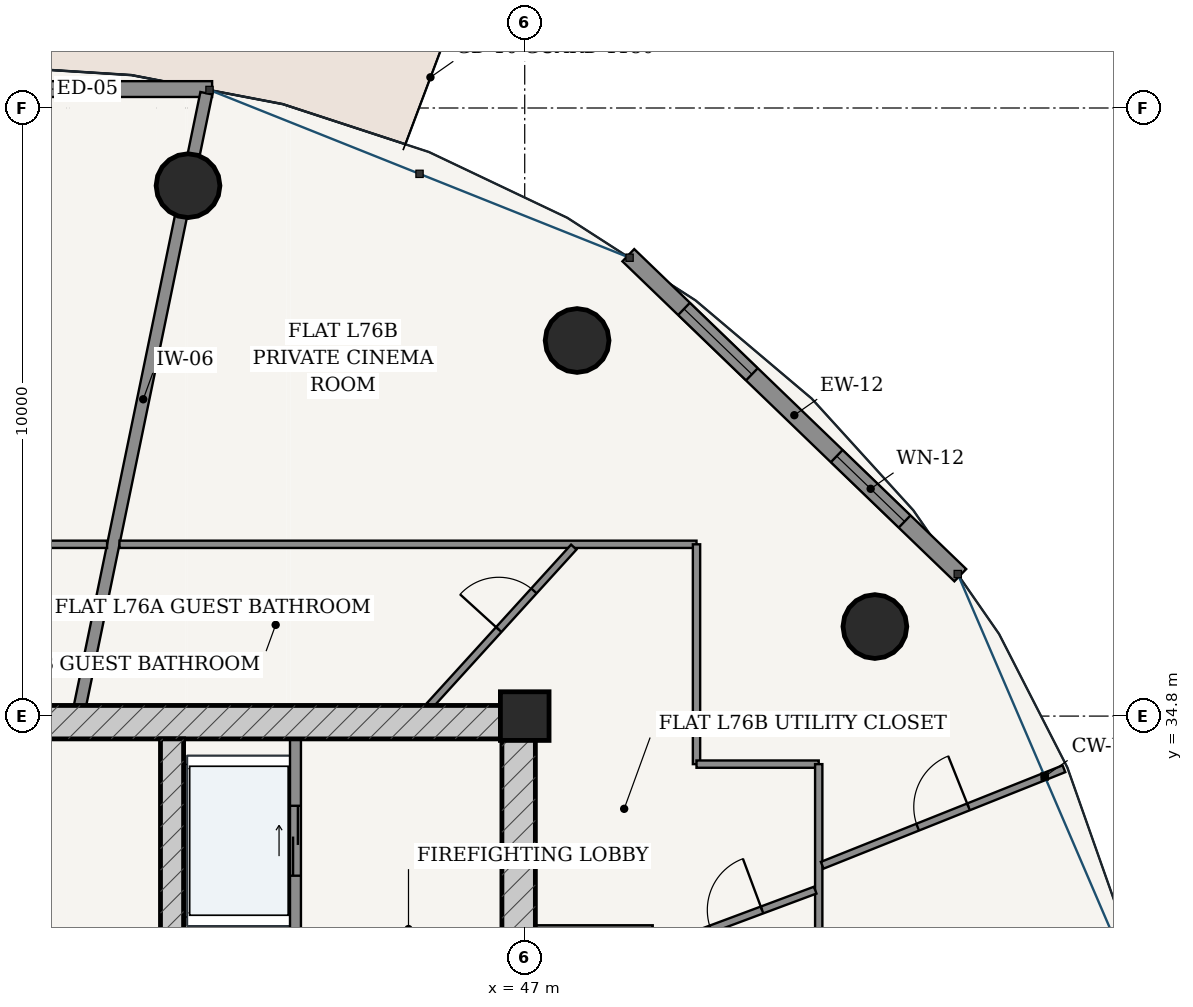
"""IFC4 building model, lengths in metres.
Left out: names, types, materials, properties, quantities, classifications, styles, units other than length and angle.
Written with IfcOpenShell. Run it as: python <this file> out.ifc"""

import sys

from ifc_helpers import new_model, si_unit, direction, frame, frame_2d, origin, origin_2d, place, context, subcontext, project, spatial, rectangle, hollow_circle, extrude, source, transform, mapped, element, fill, save


model = new_model("IFC4")
c1 = context("Model", 3, precision=1e-05, world=origin(), true_north=direction((-0.2419218956, 0.970295726276)))
c2 = subcontext(c1, "Body", "Model", "MODEL_VIEW")
j1 = project(units=[si_unit("LENGTHUNIT", "METRE"), si_unit("PLANEANGLEUNIT", "RADIAN")], contexts=[c1])
p1 = place(None, origin())
s1 = spatial("IfcSite", under=j1, at=p1, CompositionType="ELEMENT")
p2 = place(p1, origin())
s2 = spatial("IfcBuilding", under=s1, at=p2, CompositionType="ELEMENT")
p3 = place(p2, frame((0.0, 0.0, 289.45)))
s3 = spatial("IfcBuildingStorey", under=s2, at=p3, CompositionType="ELEMENT", Elevation=289.45)
p4 = place(p3, frame((47.0, 34.8, 0.0), z_axis=(0.0, 0.0, 1.0), x_axis=(1.0, 0.0, 0.0)))
e1 = element("IfcColumn", 1, at=p4, inside=s3, PredefinedType="COLUMN", context=c2, shape_type="SweptSolid", body=[
    extrude(rectangle(XDim=0.8, YDim=0.8, at=origin_2d()), origin(), (0.0, 0.0, 1.0), 3.75),
])
p5 = place(p3, frame((28.825, 34.7, 0.0), z_axis=(0.0, 0.0, 1.0), x_axis=(1.0, 0.0, 0.0)))
e2 = element("IfcWall", 2, at=p5, inside=s3, PredefinedType="SHEAR", context=c2, shape_type="SweptSolid", body=[
    extrude(rectangle(XDim=18.35, YDim=0.55, at=frame_2d((9.175, 0.0))), origin(), (0.0, 0.0, 1.0), 3.49),
])
p6 = place(p3, frame((46.9, 19.175, 0.0), z_axis=(0.0, 0.0, 1.0), x_axis=(0.0, 1.0, 0.0)))
e3 = element("IfcWall", 3, at=p6, inside=s3, PredefinedType="SHEAR", context=c2, shape_type="SweptSolid", body=[
    extrude(rectangle(XDim=15.25, YDim=0.55, at=frame_2d((7.625, 0.0))), origin(), (0.0, 0.0, 1.0), 3.49),
])
p7 = place(p6, frame((9.875, 0.0, 0.0)))
e4 = element("IfcOpeningElement", 4, at=p7, cuts=e3, PredefinedType="OPENING", context=c2, shape_type="SweptSolid", body=[
    extrude(rectangle(XDim=1.5, YDim=2.2, at=frame_2d((0.75, 1.1))), frame((0.0, 0.285, 0.0), z_axis=(0.0, -1.0, 0.0), x_axis=(1.0, 0.0, 0.0)), (0.0, 0.0, 1.0), 0.57),
])
p8 = place(p3, frame((41.2, 19.175, 0.0), z_axis=(0.0, 0.0, 1.0), x_axis=(0.0, 1.0, 0.0)))
e5 = element("IfcWall", 5, at=p8, inside=s3, PredefinedType="SHEAR", context=c2, shape_type="SweptSolid", body=[
    extrude(rectangle(XDim=15.25, YDim=0.38, at=frame_2d((7.625, 0.0))), origin(), (0.0, 0.0, 1.0), 3.49),
])
p9 = place(p8, frame((7.8, 0.0, 0.0)))
e6 = element("IfcOpeningElement", 6, at=p9, cuts=e5, PredefinedType="OPENING", context=c2, shape_type="SweptSolid", body=[
    extrude(rectangle(XDim=1.05, YDim=2.15, at=frame_2d((0.525, 1.075))), frame((0.0, 0.2, 0.0), z_axis=(0.0, -1.0, 0.0), x_axis=(1.0, 0.0, 0.0)), (0.0, 0.0, 1.0), 0.4),
])
for number, where, z_axis, x_axis in (
    (7, (52.759, 36.272, 0.0), (0.0, 0.0, 1.0), (1.0, 0.0, 0.0)),
    (8, (47.861, 40.977, 0.0), (0.0, 0.0, 1.0), (1.0, 0.0, 0.0)),
    (9, (41.463, 43.522, 0.0), (0.0, 0.0, 1.0), (1.0, 0.0, 0.0)),
):
    element("IfcColumn", number, at=place(p3, frame(where, z_axis=z_axis, x_axis=x_axis)), inside=s3, PredefinedType="COLUMN", context=c2, shape_type="SweptSolid", body=[
        extrude(hollow_circle(Radius=0.525, WallThickness=0.035, at=origin_2d()), origin(), (0.0, 0.0, 1.0), 3.75),
    ])
p10 = place(p3, frame((54.163, 37.117, 0.0), z_axis=(0.0, 0.0, 1.0), x_axis=(-0.719979309073, 0.693995529169, 0.0)))
e10 = element("IfcWall", 10, at=p10, inside=s3, PredefinedType="SOLIDWALL", context=c2, shape_type="SweptSolid", body=[
    extrude(rectangle(XDim=7.583, YDim=0.28, at=frame_2d((3.791, 0.0))), origin(), (0.0, 0.0, 1.0), 3.49),
])
p11 = place(p10, frame((1.272, 0.0, 0.85)))
e11 = element("IfcOpeningElement", 11, at=p11, cuts=e10, PredefinedType="OPENING", context=c2, shape_type="SweptSolid", body=[
    extrude(rectangle(XDim=1.55, YDim=1.95, at=frame_2d((0.775, 0.975))), frame((0.0, 0.15, 0.0), z_axis=(0.0, -1.0, 0.0), x_axis=(1.0, 0.0, 0.0)), (0.0, 0.0, 1.0), 0.3),
])
p12 = place(p10, frame((4.76, 0.0, 0.85)))
e12 = element("IfcOpeningElement", 12, at=p12, cuts=e10, PredefinedType="OPENING", context=c2, shape_type="SweptSolid", body=[
    extrude(rectangle(XDim=1.55, YDim=1.95, at=frame_2d((0.775, 0.975))), frame((0.0, 0.15, 0.0), z_axis=(0.0, -1.0, 0.0), x_axis=(1.0, 0.0, 0.0)), (0.0, 0.0, 1.0), 0.3),
])
p13 = place(p3, frame((41.859, 45.111, 0.0), z_axis=(0.0, 0.0, 1.0), x_axis=(-1.0, 0.0, 0.0)))
e13 = element("IfcWall", 13, at=p13, inside=s3, PredefinedType="SOLIDWALL", context=c2, shape_type="SweptSolid", body=[
    extrude(rectangle(XDim=7.718, YDim=0.26, at=frame_2d((3.859, 0.0))), origin(), (0.0, 0.0, 1.0), 3.49),
])
p14 = place(p13, frame((3.184, 0.0, 0.0)))
e14 = element("IfcOpeningElement", 14, at=p14, cuts=e13, PredefinedType="OPENING", context=c2, shape_type="SweptSolid", body=[
    extrude(rectangle(XDim=1.35, YDim=2.2, at=frame_2d((0.675, 1.1))), frame((0.0, 0.14, 0.0), z_axis=(0.0, -1.0, 0.0), x_axis=(1.0, 0.0, 0.0)), (0.0, 0.0, 1.0), 0.28),
])
p15 = place(p3, frame((43.23, 28.52, 0.0), z_axis=(0.0, 0.0, 1.0), x_axis=(0.0, 1.0, 0.0)))
e15 = element("IfcWall", 15, at=p15, inside=s3, PredefinedType="PARTITIONING", context=c2, shape_type="SweptSolid", body=[
    extrude(rectangle(XDim=5.905, YDim=0.18, at=frame_2d((2.953, 0.0))), origin(), (0.0, 0.0, 1.0), 3.49),
])
p16 = place(p15, frame((0.905, 0.0, 0.0)))
e16 = element("IfcOpeningElement", 16, at=p16, cuts=e15, PredefinedType="OPENING", context=c2, shape_type="SweptSolid", body=[
    extrude(rectangle(XDim=0.85, YDim=2.1, at=frame_2d((0.425, 1.05))), frame((0.0, 0.1, 0.0), z_axis=(0.0, -1.0, 0.0), x_axis=(1.0, 0.0, 0.0)), (0.0, 0.0, 1.0), 0.2),
])
p17 = place(p15, frame((3.655, 0.0, 0.0)))
e17 = element("IfcOpeningElement", 17, at=p17, cuts=e15, PredefinedType="OPENING", context=c2, shape_type="SweptSolid", body=[
    extrude(rectangle(XDim=1.15, YDim=2.2, at=frame_2d((0.575, 1.1))), frame((0.0, 0.1, 0.0), z_axis=(0.0, -1.0, 0.0), x_axis=(1.0, 0.0, 0.0)), (0.0, 0.0, 1.0), 0.2),
])
p18 = place(p3, frame((47.175, 31.28, 0.0), z_axis=(0.0, 0.0, 1.0), x_axis=(1.0, 0.0, 0.0)))
e18 = element("IfcWall", 18, at=p18, inside=s3, PredefinedType="PARTITIONING", context=c2, shape_type="SweptSolid", body=[
    extrude(rectangle(XDim=1.93, YDim=0.16, at=frame_2d((0.965, 0.0))), origin(), (0.0, 0.0, 1.0), 3.49),
])
p19 = place(p3, frame((39.688, 34.977, 0.0), z_axis=(0.0, 0.0, 1.0), x_axis=(0.202091890364, 0.979366564596, 0.0)))
e19 = element("IfcWall", 19, at=p19, inside=s3, PredefinedType="PARTITIONING", context=c2, shape_type="SweptSolid", body=[
    extrude(rectangle(XDim=10.278, YDim=0.2, at=frame_2d((5.139, 0.0))), origin(), (0.0, 0.0, 1.0), 2.575),
])
p20 = place(p3, frame((26.175, 37.625, 0.0), z_axis=(0.0, 0.0, 1.0), x_axis=(1.0, 0.0, 0.0)))
e20 = element("IfcWall", 20, at=p20, inside=s3, PredefinedType="PARTITIONING", context=c2, shape_type="SweptSolid", body=[
    extrude(rectangle(XDim=13.957, YDim=0.12, at=frame_2d((6.979, 0.0))), origin(), (0.0, 0.0, 1.0), 3.015),
])
p21 = place(p20, frame((10.852, 0.0, 0.0)))
e21 = element("IfcOpeningElement", 21, at=p21, cuts=e20, PredefinedType="OPENING", context=c2, shape_type="SweptSolid", body=[
    extrude(rectangle(XDim=0.86, YDim=2.15, at=frame_2d((0.43, 1.075))), frame((0.0, 0.07, 0.0), z_axis=(0.0, -1.0, 0.0), x_axis=(1.0, 0.0, 0.0)), (0.0, 0.0, 1.0), 0.14),
])
p22 = place(p20, frame((4.183, 0.0, 0.0)))
e22 = element("IfcOpeningElement", 22, at=p22, cuts=e20, PredefinedType="OPENING", context=c2, shape_type="SweptSolid", body=[
    extrude(rectangle(XDim=0.9, YDim=2.15, at=frame_2d((0.45, 1.075))), frame((0.0, 0.07, 0.0), z_axis=(0.0, -1.0, 0.0), x_axis=(1.0, 0.0, 0.0)), (0.0, 0.0, 1.0), 0.14),
])
p23 = place(p3, frame((40.336, 37.625, 0.0), z_axis=(0.0, 0.0, 1.0), x_axis=(1.0, 0.0, 0.0)))
e23 = element("IfcWall", 23, at=p23, inside=s3, PredefinedType="PARTITIONING", context=c2, shape_type="SweptSolid", body=[
    extrude(rectangle(XDim=9.489, YDim=0.12, at=frame_2d((4.745, 0.0))), origin(), (0.0, 0.0, 1.0), 3.015),
])
p24 = place(p3, frame((49.825, 37.625, 0.0), z_axis=(0.0, 0.0, 1.0), x_axis=(0.0, -1.0, 0.0)))
e24 = element("IfcWall", 24, at=p24, inside=s3, PredefinedType="PARTITIONING", context=c2, shape_type="SweptSolid", body=[
    extrude(rectangle(XDim=3.615, YDim=0.12, at=frame_2d((1.808, 0.0))), origin(), (0.0, 0.0, 1.0), 3.015),
])
p25 = place(p3, frame((49.825, 34.01, 0.0), z_axis=(0.0, 0.0, 1.0), x_axis=(1.0, 0.0, 0.0)))
e25 = element("IfcWall", 25, at=p25, inside=s3, PredefinedType="PARTITIONING", context=c2, shape_type="SweptSolid", body=[
    extrude(rectangle(XDim=2.01, YDim=0.12, at=frame_2d((1.005, 0.0))), origin(), (0.0, 0.0, 1.0), 3.209),
])
p26 = place(p3, frame((51.835, 34.01, 0.0), z_axis=(0.0, 0.0, 1.0), x_axis=(0.0, -1.0, 0.0)))
e26 = element("IfcWall", 26, at=p26, inside=s3, PredefinedType="PARTITIONING", context=c2, shape_type="SweptSolid", body=[
    extrude(rectangle(XDim=19.545, YDim=0.12, at=frame_2d((9.772, 0.0))), origin(), (0.0, 0.0, 1.0), 3.015),
])
p27 = place(p26, frame((14.768, 0.0, 0.0)))
e27 = element("IfcOpeningElement", 27, at=p27, cuts=e26, PredefinedType="OPENING", context=c2, shape_type="SweptSolid", body=[
    extrude(rectangle(XDim=0.9, YDim=2.15, at=frame_2d((0.45, 1.075))), frame((0.0, 0.07, 0.0), z_axis=(0.0, -1.0, 0.0), x_axis=(1.0, 0.0, 0.0)), (0.0, 0.0, 1.0), 0.14),
])
p28 = place(p26, frame((8.718, 0.0, 0.0)))
e28 = element("IfcOpeningElement", 28, at=p28, cuts=e26, PredefinedType="OPENING", context=c2, shape_type="SweptSolid", body=[
    extrude(rectangle(XDim=0.9, YDim=2.15, at=frame_2d((0.45, 1.075))), frame((0.0, 0.07, 0.0), z_axis=(0.0, -1.0, 0.0), x_axis=(1.0, 0.0, 0.0)), (0.0, 0.0, 1.0), 0.14),
])
p29 = place(p26, frame((4.14, 0.0, 0.0)))
e29 = element("IfcOpeningElement", 29, at=p29, cuts=e26, PredefinedType="OPENING", context=c2, shape_type="SweptSolid", body=[
    extrude(rectangle(XDim=0.9, YDim=2.15, at=frame_2d((0.45, 1.075))), frame((0.0, 0.07, 0.0), z_axis=(0.0, -1.0, 0.0), x_axis=(1.0, 0.0, 0.0)), (0.0, 0.0, 1.0), 0.14),
])
p30 = place(p3, frame((51.893, 32.347, 0.0), z_axis=(0.0, 0.0, 1.0), x_axis=(0.928712556691, 0.370800467966, 0.0)))
e30 = element("IfcWall", 30, at=p30, inside=s3, PredefinedType="PARTITIONING", context=c2, shape_type="SweptSolid", body=[
    extrude(rectangle(XDim=4.28, YDim=0.12, at=frame_2d((2.14, 0.0))), origin(), (0.0, 0.0, 1.0), 3.121),
])
p31 = place(p30, frame((1.69, 0.0, 0.0)))
e31 = element("IfcOpeningElement", 31, at=p31, cuts=e30, PredefinedType="OPENING", context=c2, shape_type="SweptSolid", body=[
    extrude(rectangle(XDim=0.9, YDim=2.15, at=frame_2d((0.45, 1.075))), frame((0.0, 0.07, 0.0), z_axis=(0.0, -1.0, 0.0), x_axis=(1.0, 0.0, 0.0)), (0.0, 0.0, 1.0), 0.14),
])
p32 = place(p3, frame((49.185, 30.971, 0.0), z_axis=(0.0, 0.0, 1.0), x_axis=(0.93696600231, 0.349420535338, 0.0)))
e32 = element("IfcWall", 32, at=p32, inside=s3, PredefinedType="PARTITIONING", context=c2, shape_type="SweptSolid", body=[
    extrude(rectangle(XDim=2.766, YDim=0.12, at=frame_2d((1.383, 0.0))), origin(), (0.0, 0.0, 1.0), 3.209),
])
p33 = place(p32, frame((0.933, 0.0, 0.0)))
e33 = element("IfcOpeningElement", 33, at=p33, cuts=e32, PredefinedType="OPENING", context=c2, shape_type="SweptSolid", body=[
    extrude(rectangle(XDim=0.9, YDim=2.15, at=frame_2d((0.45, 1.075))), frame((0.0, 0.07, 0.0), z_axis=(0.0, -1.0, 0.0), x_axis=(1.0, 0.0, 0.0)), (0.0, 0.0, 1.0), 0.14),
])
p34 = place(p3, frame((45.439, 34.977, 0.0), z_axis=(0.0, 0.0, 1.0), x_axis=(0.672980108938, 0.739660579573, 0.0)))
e34 = element("IfcWall", 34, at=p34, inside=s3, PredefinedType="PARTITIONING", context=c2, shape_type="SweptSolid", body=[
    extrude(rectangle(XDim=3.519, YDim=0.12, at=frame_2d((1.759, 0.0))), origin(), (0.0, 0.0, 1.0), 3.015),
])
p35 = place(p34, frame((1.685, 0.0, 0.0)))
e35 = element("IfcOpeningElement", 35, at=p35, cuts=e34, PredefinedType="OPENING", context=c2, shape_type="SweptSolid", body=[
    extrude(rectangle(XDim=0.86, YDim=2.15, at=frame_2d((0.43, 1.075))), frame((0.0, 0.07, 0.0), z_axis=(0.0, -1.0, 0.0), x_axis=(1.0, 0.0, 0.0)), (0.0, 0.0, 1.0), 0.14),
])
m1 = source(origin(), c2, "Body", "SweptSolid", [
    extrude(rectangle(XDim=1.55, YDim=1.95, at=frame_2d((0.775, 0.975))), frame((0.0, 0.03, 0.0), z_axis=(0.0, -1.0, 0.0), x_axis=(1.0, 0.0, 0.0)), (0.0, 0.0, 1.0), 0.06),
])
p36 = place(p11, origin())
e36 = element("IfcWindow", 36, at=p36, inside=s3, PartitioningType="SINGLE_PANEL", PredefinedType="WINDOW", context=c2, shape_type="MappedRepresentation", body=[
    mapped(m1, transform((0.0, 0.0, 0.0), scale=1.0)),
])
fill(e11, e36)
p37 = place(p12, origin())
e37 = element("IfcWindow", 37, at=p37, inside=s3, PartitioningType="SINGLE_PANEL", PredefinedType="WINDOW", context=c2, shape_type="MappedRepresentation", body=[
    mapped(m1, transform((0.0, 0.0, 0.0), scale=1.0)),
])
fill(e12, e37)
m2 = source(origin(), c2, "Body", "SweptSolid", [
    extrude(rectangle(XDim=1.15, YDim=2.2, at=frame_2d((0.575, 1.1))), frame((0.0, 0.025, 0.0), z_axis=(0.0, -1.0, 0.0), x_axis=(1.0, 0.0, 0.0)), (0.0, 0.0, 1.0), 0.05),
])
p38 = place(p17, origin())
e38 = element("IfcDoor", 38, at=p38, inside=s3, OperationType="DOUBLE_DOOR_SLIDING", PredefinedType="DOOR", context=c2, shape_type="MappedRepresentation", body=[
    mapped(m2, transform((0.0, 0.0, 0.0), scale=1.0)),
])
fill(e17, e38)
m3 = source(origin(), c2, "Body", "SweptSolid", [
    extrude(rectangle(XDim=0.9, YDim=2.15, at=frame_2d((0.45, 1.075))), frame((0.0, 0.025, 0.0), z_axis=(0.0, -1.0, 0.0), x_axis=(1.0, 0.0, 0.0)), (0.0, 0.0, 1.0), 0.05),
])
p39 = place(p33, origin())
e39 = element("IfcDoor", 39, at=p39, inside=s3, OperationType="SINGLE_SWING_RIGHT", PredefinedType="DOOR", context=c2, shape_type="MappedRepresentation", body=[
    mapped(m3, transform((0.0, 0.0, 0.0), scale=1.0)),
])
fill(e33, e39)
m4 = source(origin(), c2, "Body", "SweptSolid", [
    extrude(rectangle(XDim=0.86, YDim=2.15, at=frame_2d((0.43, 1.075))), frame((0.0, 0.025, 0.0), z_axis=(0.0, -1.0, 0.0), x_axis=(1.0, 0.0, 0.0)), (0.0, 0.0, 1.0), 0.05),
])
p40 = place(p35, origin())
e40 = element("IfcDoor", 40, at=p40, inside=s3, OperationType="SINGLE_SWING_LEFT", PredefinedType="DOOR", context=c2, shape_type="MappedRepresentation", body=[
    mapped(m4, transform((0.0, 0.0, 0.0), scale=1.0)),
])
fill(e35, e40)
p41 = place(p31, origin())
e41 = element("IfcDoor", 41, at=p41, inside=s3, OperationType="SINGLE_SWING_RIGHT", PredefinedType="DOOR", context=c2, shape_type="MappedRepresentation", body=[
    mapped(m3, transform((0.0, 0.0, 0.0), scale=1.0)),
])
fill(e31, e41)
save(model, sys.argv[1])
